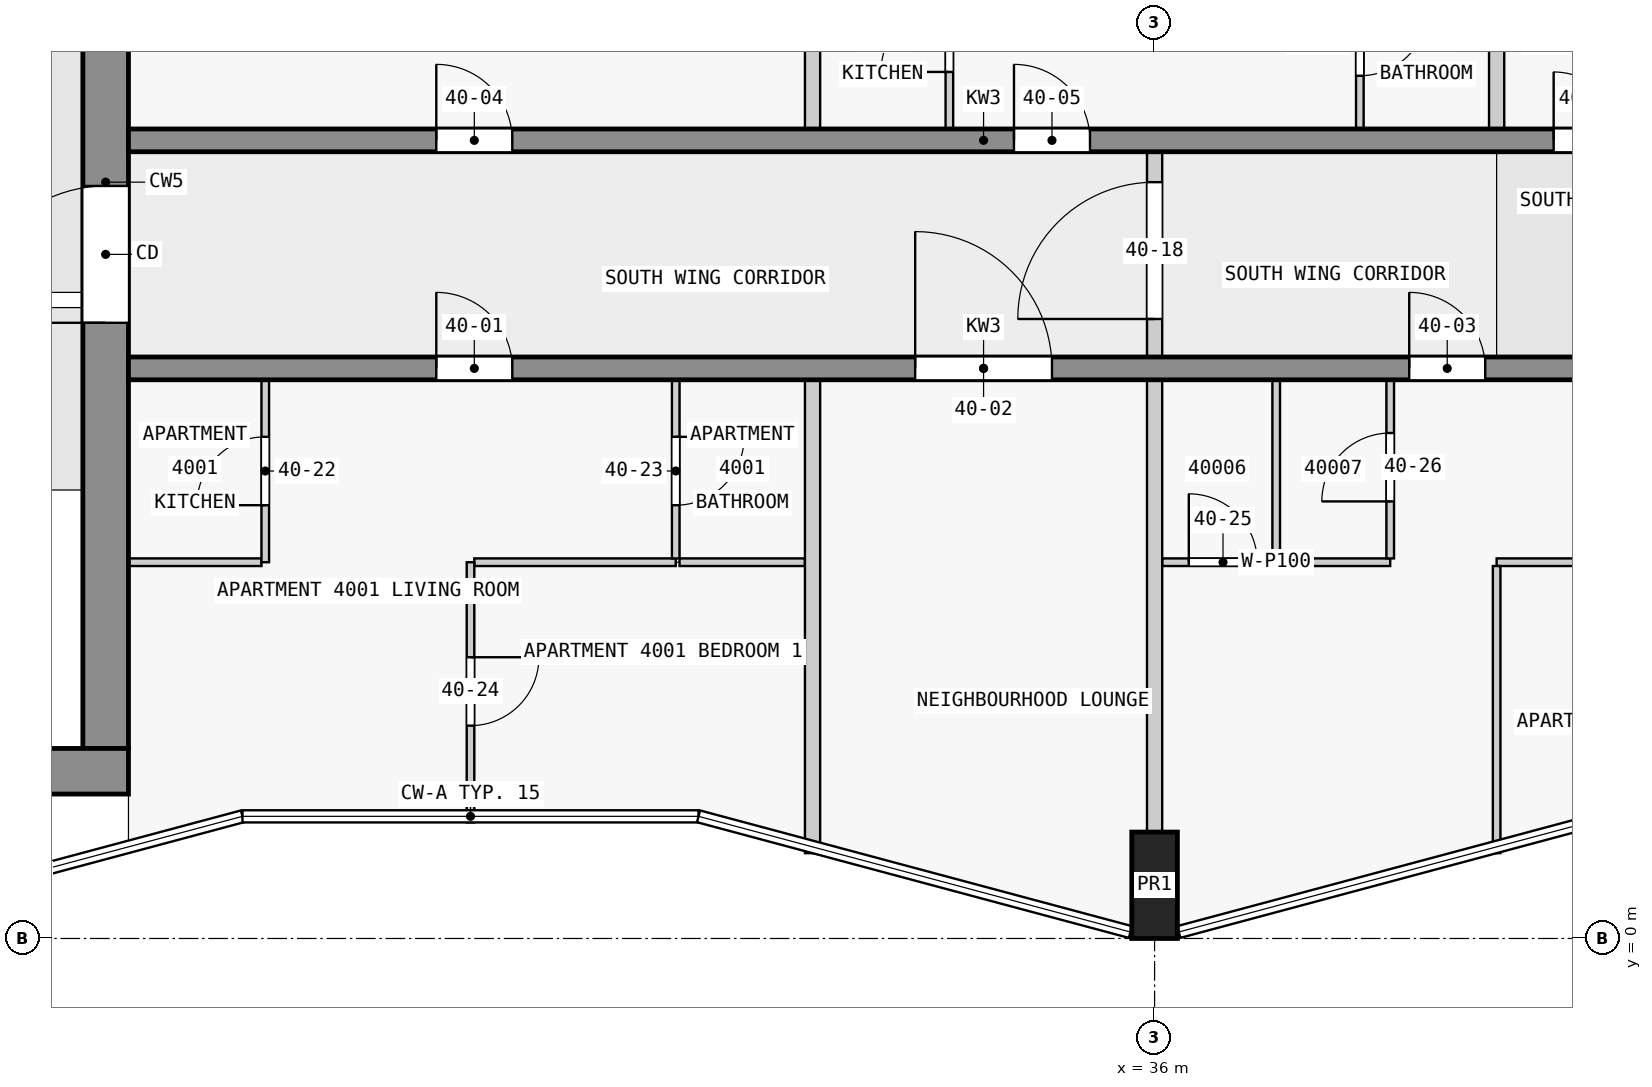
"""IFC4 building model, lengths in metres.
Left out: names, types, materials, properties, quantities, classifications, styles, units other than length and angle.
Written with IfcOpenShell. Run it as: python <this file> out.ifc"""

import sys

from ifc_helpers import new_model, si_unit, direction, frame, frame_2d, origin, origin_2d, place, context, subcontext, project, spatial, rectangle, extrude, element, fill, save


model = new_model("IFC4")
c1 = context("Model", 3, precision=1e-05, world=origin(), true_north=direction((0.0, 1.0)))
c2 = subcontext(c1, "Body", "Model", "MODEL_VIEW")
j1 = project(units=[si_unit("LENGTHUNIT", "METRE"), si_unit("PLANEANGLEUNIT", "RADIAN")], contexts=[c1])
p1 = place(None, origin())
s1 = spatial("IfcSite", under=j1, at=p1, CompositionType="ELEMENT")
p2 = place(p1, origin())
s2 = spatial("IfcBuilding", under=s1, at=p2, CompositionType="ELEMENT")
p3 = place(p2, frame((0.0, 0.0, 156.9)))
s3 = spatial("IfcBuildingStorey", under=s2, at=p3, CompositionType="ELEMENT", Elevation=156.9)
p4 = place(p3, frame((36.0, 0.7, 0.0), z_axis=(0.0, 0.0, 1.0), x_axis=(1.0, 0.0, 0.0)))
e1 = element("IfcColumn", 1, at=p4, inside=s3, PredefinedType="COLUMN", context=c2, shape_type="SweptSolid", body=[
    extrude(rectangle(XDim=0.6, YDim=1.4, at=origin_2d()), origin(), (0.0, 0.0, 1.0), 3.5),
])
p5 = place(p3, frame((1.7, 2.2, 0.0), z_axis=(0.0, 0.0, 1.0), x_axis=(1.0, 0.0, 0.0)))
e2 = element("IfcWall", 2, at=p5, inside=s3, PredefinedType="SHEAR", context=c2, shape_type="SweptSolid", body=[
    extrude(rectangle(XDim=20.8, YDim=0.6, at=frame_2d((10.4, 0.0))), origin(), (0.0, 0.0, 1.0), 3.25),
])
p6 = place(p3, frame((22.2, 2.5, 0.0), z_axis=(0.0, 0.0, 1.0), x_axis=(0.0, 1.0, 0.0)))
e3 = element("IfcWall", 3, at=p6, inside=s3, PredefinedType="SHEAR", context=c2, shape_type="SweptSolid", body=[
    extrude(rectangle(XDim=14.9, YDim=0.6, at=frame_2d((7.45, 0.0))), origin(), (0.0, 0.0, 1.0), 3.25),
])
p7 = place(p6, frame((5.6, 0.0, 0.0)))
e4 = element("IfcOpeningElement", 4, at=p7, cuts=e3, PredefinedType="OPENING", context=c2, shape_type="SweptSolid", body=[
    extrude(rectangle(XDim=1.8, YDim=2.1, at=frame_2d((0.9, 1.05))), frame((0.0, 0.31, 0.0), z_axis=(0.0, -1.0, 0.0), x_axis=(1.0, 0.0, 0.0)), (0.0, 0.0, 1.0), 0.62),
])
p8 = place(p3, frame((22.5, 7.5, 0.0), z_axis=(0.0, 0.0, 1.0), x_axis=(1.0, 0.0, 0.0)))
e5 = element("IfcWall", 5, at=p8, inside=s3, PredefinedType="SHEAR", context=c2, shape_type="SweptSolid", body=[
    extrude(rectangle(XDim=22.5, YDim=0.3, at=frame_2d((11.25, 0.0))), origin(), (0.0, 0.0, 1.0), 3.25),
])
p9 = place(p8, frame((4.05, 0.0, 0.0)))
e6 = element("IfcOpeningElement", 6, at=p9, cuts=e5, PredefinedType="OPENING", context=c2, shape_type="SweptSolid", body=[
    extrude(rectangle(XDim=1.0, YDim=2.1, at=frame_2d((0.5, 1.05))), frame((0.0, 0.16, 0.0), z_axis=(0.0, -1.0, 0.0), x_axis=(1.0, 0.0, 0.0)), (0.0, 0.0, 1.0), 0.32),
])
p10 = place(p8, frame((10.35, 0.0, 0.0)))
e7 = element("IfcOpeningElement", 7, at=p10, cuts=e5, PredefinedType="OPENING", context=c2, shape_type="SweptSolid", body=[
    extrude(rectangle(XDim=1.8, YDim=2.1, at=frame_2d((0.9, 1.05))), frame((0.0, 0.16, 0.0), z_axis=(0.0, -1.0, 0.0), x_axis=(1.0, 0.0, 0.0)), (0.0, 0.0, 1.0), 0.32),
])
p11 = place(p8, frame((16.85, 0.0, 0.0)))
e8 = element("IfcOpeningElement", 8, at=p11, cuts=e5, PredefinedType="OPENING", context=c2, shape_type="SweptSolid", body=[
    extrude(rectangle(XDim=1.0, YDim=2.1, at=frame_2d((0.5, 1.05))), frame((0.0, 0.16, 0.0), z_axis=(0.0, -1.0, 0.0), x_axis=(1.0, 0.0, 0.0)), (0.0, 0.0, 1.0), 0.32),
])
p12 = place(p3, frame((22.5, 10.5, 0.0), z_axis=(0.0, 0.0, 1.0), x_axis=(1.0, 0.0, 0.0)))
e9 = element("IfcWall", 9, at=p12, inside=s3, PredefinedType="SHEAR", context=c2, shape_type="SweptSolid", body=[
    extrude(rectangle(XDim=22.5, YDim=0.3, at=frame_2d((11.25, 0.0))), origin(), (0.0, 0.0, 1.0), 3.25),
])
p13 = place(p12, frame((4.05, 0.0, 0.0)))
e10 = element("IfcOpeningElement", 10, at=p13, cuts=e9, PredefinedType="OPENING", context=c2, shape_type="SweptSolid", body=[
    extrude(rectangle(XDim=1.0, YDim=2.1, at=frame_2d((0.5, 1.05))), frame((0.0, 0.16, 0.0), z_axis=(0.0, -1.0, 0.0), x_axis=(1.0, 0.0, 0.0)), (0.0, 0.0, 1.0), 0.32),
])
p14 = place(p12, frame((11.65, 0.0, 0.0)))
e11 = element("IfcOpeningElement", 11, at=p14, cuts=e9, PredefinedType="OPENING", context=c2, shape_type="SweptSolid", body=[
    extrude(rectangle(XDim=1.0, YDim=2.1, at=frame_2d((0.5, 1.05))), frame((0.0, 0.16, 0.0), z_axis=(0.0, -1.0, 0.0), x_axis=(1.0, 0.0, 0.0)), (0.0, 0.0, 1.0), 0.32),
])
p15 = place(p12, frame((18.75, 0.0, 0.0)))
e12 = element("IfcOpeningElement", 12, at=p15, cuts=e9, PredefinedType="OPENING", context=c2, shape_type="SweptSolid", body=[
    extrude(rectangle(XDim=0.9, YDim=2.1, at=frame_2d((0.45, 1.05))), frame((0.0, 0.16, 0.0), z_axis=(0.0, -1.0, 0.0), x_axis=(1.0, 0.0, 0.0)), (0.0, 0.0, 1.0), 0.32),
])
p16 = place(p12, frame((20.95, 0.0, 0.0)))
e13 = element("IfcOpeningElement", 13, at=p16, cuts=e9, PredefinedType="OPENING", context=c2, shape_type="SweptSolid", body=[
    extrude(rectangle(XDim=1.0, YDim=2.1, at=frame_2d((0.5, 1.05))), frame((0.0, 0.16, 0.0), z_axis=(0.0, -1.0, 0.0), x_axis=(1.0, 0.0, 0.0)), (0.0, 0.0, 1.0), 0.32),
])
p17 = place(p3, frame((29.7, 4.95, 0.0), z_axis=(0.0, 0.0, 1.0), x_axis=(-1.0, 0.0, 0.0)))
e14 = element("IfcWall", 14, at=p17, inside=s3, PredefinedType="PARTITIONING", context=c2, shape_type="SweptSolid", body=[
    extrude(rectangle(XDim=2.65, YDim=0.1, at=frame_2d((1.325, 0.0))), origin(), (0.0, 0.0, 1.0), 3.25),
])
p18 = place(p3, frame((54.08, 4.95, 0.0), z_axis=(0.0, 0.0, 1.0), x_axis=(-1.0, 0.0, 0.0)))
e15 = element("IfcWall", 15, at=p18, inside=s3, PredefinedType="PARTITIONING", context=c2, shape_type="SweptSolid", body=[
    extrude(rectangle(XDim=13.58, YDim=0.1, at=frame_2d((6.79, 0.0))), origin(), (0.0, 0.0, 1.0), 3.25),
])
p19 = place(p18, frame((10.85, 0.0, 0.0)))
e16 = element("IfcOpeningElement", 16, at=p19, cuts=e15, PredefinedType="OPENING", context=c2, shape_type="SweptSolid", body=[
    extrude(rectangle(XDim=0.9, YDim=2.1, at=frame_2d((0.45, 1.05))), frame((0.0, 0.06, 0.0), z_axis=(0.0, -1.0, 0.0), x_axis=(1.0, 0.0, 0.0)), (0.0, 0.0, 1.0), 0.12),
])
p20 = place(p18, frame((6.45, 0.0, 0.0)))
e17 = element("IfcOpeningElement", 17, at=p20, cuts=e15, PredefinedType="OPENING", context=c2, shape_type="SweptSolid", body=[
    extrude(rectangle(XDim=0.9, YDim=2.1, at=frame_2d((0.45, 1.05))), frame((0.0, 0.06, 0.0), z_axis=(0.0, -1.0, 0.0), x_axis=(1.0, 0.0, 0.0)), (0.0, 0.0, 1.0), 0.12),
])
p21 = place(p18, frame((1.95, 0.0, 0.0)))
e18 = element("IfcOpeningElement", 18, at=p21, cuts=e15, PredefinedType="OPENING", context=c2, shape_type="SweptSolid", body=[
    extrude(rectangle(XDim=0.9, YDim=2.1, at=frame_2d((0.45, 1.05))), frame((0.0, 0.06, 0.0), z_axis=(0.0, -1.0, 0.0), x_axis=(1.0, 0.0, 0.0)), (0.0, 0.0, 1.0), 0.12),
])
p22 = place(p3, frame((22.5, 4.95, 0.0), z_axis=(0.0, 0.0, 1.0), x_axis=(1.0, 0.0, 0.0)))
e19 = element("IfcWall", 19, at=p22, inside=s3, PredefinedType="PARTITIONING", context=c2, shape_type="SweptSolid", body=[
    extrude(rectangle(XDim=1.75, YDim=0.1, at=frame_2d((0.875, 0.0))), origin(), (0.0, 0.0, 1.0), 3.25),
])
p23 = place(p3, frame((29.75, 4.95, 0.0), z_axis=(0.0, 0.0, 1.0), x_axis=(1.0, 0.0, 0.0)))
e20 = element("IfcWall", 20, at=p23, inside=s3, PredefinedType="PARTITIONING", context=c2, shape_type="SweptSolid", body=[
    extrude(rectangle(XDim=1.65, YDim=0.1, at=frame_2d((0.825, 0.0))), origin(), (0.0, 0.0, 1.0), 3.25),
])
p24 = place(p3, frame((36.1, 4.95, 0.0), z_axis=(0.0, 0.0, 1.0), x_axis=(1.0, 0.0, 0.0)))
e21 = element("IfcWall", 21, at=p24, inside=s3, PredefinedType="PARTITIONING", context=c2, shape_type="SweptSolid", body=[
    extrude(rectangle(XDim=3.0, YDim=0.1, at=frame_2d((1.5, 0.0))), origin(), (0.0, 0.0, 1.0), 3.25),
])
p25 = place(p24, frame((0.35, 0.0, 0.0)))
e22 = element("IfcOpeningElement", 22, at=p25, cuts=e21, PredefinedType="OPENING", context=c2, shape_type="SweptSolid", body=[
    extrude(rectangle(XDim=0.9, YDim=2.1, at=frame_2d((0.45, 1.05))), frame((0.0, 0.06, 0.0), z_axis=(0.0, -1.0, 0.0), x_axis=(1.0, 0.0, 0.0)), (0.0, 0.0, 1.0), 0.12),
])
p26 = place(p3, frame((24.3, 4.95, 0.0), z_axis=(0.0, 0.0, 1.0), x_axis=(0.0, 1.0, 0.0)))
e23 = element("IfcWall", 23, at=p26, inside=s3, PredefinedType="PARTITIONING", context=c2, shape_type="SweptSolid", body=[
    extrude(rectangle(XDim=2.4, YDim=0.1, at=frame_2d((1.2, 0.0))), origin(), (0.0, 0.0, 1.0), 3.25),
])
p27 = place(p26, frame((0.75, 0.0, 0.0)))
e24 = element("IfcOpeningElement", 24, at=p27, cuts=e23, PredefinedType="OPENING", context=c2, shape_type="SweptSolid", body=[
    extrude(rectangle(XDim=0.9, YDim=2.1, at=frame_2d((0.45, 1.05))), frame((0.0, 0.06, 0.0), z_axis=(0.0, -1.0, 0.0), x_axis=(1.0, 0.0, 0.0)), (0.0, 0.0, 1.0), 0.12),
])
p28 = place(p3, frame((27.0, 4.95, 0.0), z_axis=(0.0, 0.0, 1.0), x_axis=(0.0, -1.0, 0.0)))
e25 = element("IfcWall", 25, at=p28, inside=s3, PredefinedType="PARTITIONING", context=c2, shape_type="SweptSolid", body=[
    extrude(rectangle(XDim=3.423, YDim=0.1, at=frame_2d((1.711, 0.0))), origin(), (0.0, 0.0, 1.0), 3.25),
])
p29 = place(p28, frame((1.25, 0.0, 0.0)))
e26 = element("IfcOpeningElement", 26, at=p29, cuts=e25, PredefinedType="OPENING", context=c2, shape_type="SweptSolid", body=[
    extrude(rectangle(XDim=0.9, YDim=2.1, at=frame_2d((0.45, 1.05))), frame((0.0, 0.06, 0.0), z_axis=(0.0, -1.0, 0.0), x_axis=(1.0, 0.0, 0.0)), (0.0, 0.0, 1.0), 0.12),
])
p30 = place(p3, frame((29.7, 7.35, 0.0), z_axis=(0.0, 0.0, 1.0), x_axis=(0.0, -1.0, 0.0)))
e27 = element("IfcWall", 27, at=p30, inside=s3, PredefinedType="PARTITIONING", context=c2, shape_type="SweptSolid", body=[
    extrude(rectangle(XDim=2.35, YDim=0.1, at=frame_2d((1.175, 0.0))), origin(), (0.0, 0.0, 1.0), 3.25),
])
p31 = place(p30, frame((0.75, 0.0, 0.0)))
e28 = element("IfcOpeningElement", 28, at=p31, cuts=e27, PredefinedType="OPENING", context=c2, shape_type="SweptSolid", body=[
    extrude(rectangle(XDim=0.9, YDim=2.1, at=frame_2d((0.45, 1.05))), frame((0.0, 0.06, 0.0), z_axis=(0.0, -1.0, 0.0), x_axis=(1.0, 0.0, 0.0)), (0.0, 0.0, 1.0), 0.12),
])
for number, where, z_axis, x_axis in (
    (29, (31.5, 1.122, 0.0), (0.0, 0.0, 1.0), (0.0, 1.0, 0.0)),
    (30, (31.5, 10.65, 0.0), (0.0, 0.0, 1.0), (0.0, 1.0, 0.0)),
):
    element("IfcWall", number, at=place(p3, frame(where, z_axis=z_axis, x_axis=x_axis)), inside=s3, PredefinedType="PARTITIONING", context=c2, shape_type="SweptSolid", body=[
        extrude(rectangle(XDim=6.228, YDim=0.2, at=frame_2d((3.114, 0.0))), origin(), (0.0, 0.0, 1.0), 3.25),
    ])
p32 = place(p3, frame((33.3, 10.65, 0.0), z_axis=(0.0, 0.0, 1.0), x_axis=(0.0, 1.0, 0.0)))
e31 = element("IfcWall", 31, at=p32, inside=s3, PredefinedType="PARTITIONING", context=c2, shape_type="SweptSolid", body=[
    extrude(rectangle(XDim=2.4, YDim=0.1, at=frame_2d((1.2, 0.0))), origin(), (0.0, 0.0, 1.0), 3.25),
])
p33 = place(p32, frame((0.75, 0.0, 0.0)))
e32 = element("IfcOpeningElement", 32, at=p33, cuts=e31, PredefinedType="OPENING", context=c2, shape_type="SweptSolid", body=[
    extrude(rectangle(XDim=0.9, YDim=2.1, at=frame_2d((0.45, 1.05))), frame((0.0, 0.06, 0.0), z_axis=(0.0, -1.0, 0.0), x_axis=(1.0, 0.0, 0.0)), (0.0, 0.0, 1.0), 0.12),
])
p34 = place(p3, frame((36.0, 1.4, 0.0), z_axis=(0.0, 0.0, 1.0), x_axis=(0.0, 1.0, 0.0)))
e33 = element("IfcWall", 33, at=p34, inside=s3, PredefinedType="PARTITIONING", context=c2, shape_type="SweptSolid", body=[
    extrude(rectangle(XDim=5.95, YDim=0.2, at=frame_2d((2.975, 0.0))), origin(), (0.0, 0.0, 1.0), 3.25),
])
p35 = place(p3, frame((37.6, 5.0, 0.0), z_axis=(0.0, 0.0, 1.0), x_axis=(0.0, 1.0, 0.0)))
e34 = element("IfcWall", 34, at=p35, inside=s3, PredefinedType="PARTITIONING", context=c2, shape_type="SweptSolid", body=[
    extrude(rectangle(XDim=2.35, YDim=0.1, at=frame_2d((1.175, 0.0))), origin(), (0.0, 0.0, 1.0), 3.25),
])
p36 = place(p3, frame((38.7, 13.0, 0.0), z_axis=(0.0, 0.0, 1.0), x_axis=(0.0, -1.0, 0.0)))
e35 = element("IfcWall", 35, at=p36, inside=s3, PredefinedType="PARTITIONING", context=c2, shape_type="SweptSolid", body=[
    extrude(rectangle(XDim=2.35, YDim=0.1, at=frame_2d((1.175, 0.0))), origin(), (0.0, 0.0, 1.0), 3.25),
])
p37 = place(p36, frame((0.75, 0.0, 0.0)))
e36 = element("IfcOpeningElement", 36, at=p37, cuts=e35, PredefinedType="OPENING", context=c2, shape_type="SweptSolid", body=[
    extrude(rectangle(XDim=0.9, YDim=2.1, at=frame_2d((0.45, 1.05))), frame((0.0, 0.06, 0.0), z_axis=(0.0, -1.0, 0.0), x_axis=(1.0, 0.0, 0.0)), (0.0, 0.0, 1.0), 0.12),
])
p38 = place(p3, frame((39.1, 5.0, 0.0), z_axis=(0.0, 0.0, 1.0), x_axis=(0.0, 1.0, 0.0)))
e37 = element("IfcWall", 37, at=p38, inside=s3, PredefinedType="PARTITIONING", context=c2, shape_type="SweptSolid", body=[
    extrude(rectangle(XDim=2.35, YDim=0.1, at=frame_2d((1.175, 0.0))), origin(), (0.0, 0.0, 1.0), 3.25),
])
p39 = place(p38, frame((0.75, 0.0, 0.0)))
e38 = element("IfcOpeningElement", 38, at=p39, cuts=e37, PredefinedType="OPENING", context=c2, shape_type="SweptSolid", body=[
    extrude(rectangle(XDim=0.9, YDim=2.1, at=frame_2d((0.45, 1.05))), frame((0.0, 0.06, 0.0), z_axis=(0.0, -1.0, 0.0), x_axis=(1.0, 0.0, 0.0)), (0.0, 0.0, 1.0), 0.12),
])
p40 = place(p3, frame((40.5, 4.9, 0.0), z_axis=(0.0, 0.0, 1.0), x_axis=(0.0, -1.0, 0.0)))
e39 = element("IfcWall", 39, at=p40, inside=s3, PredefinedType="PARTITIONING", context=c2, shape_type="SweptSolid", body=[
    extrude(rectangle(XDim=3.778, YDim=0.1, at=frame_2d((1.889, 0.0))), origin(), (0.0, 0.0, 1.0), 3.25),
])
p41 = place(p3, frame((40.5, 10.65, 0.0), z_axis=(0.0, 0.0, 1.0), x_axis=(0.0, 1.0, 0.0)))
e40 = element("IfcWall", 40, at=p41, inside=s3, PredefinedType="PARTITIONING", context=c2, shape_type="SweptSolid", body=[
    extrude(rectangle(XDim=6.228, YDim=0.2, at=frame_2d((3.114, 0.0))), origin(), (0.0, 0.0, 1.0), 3.25),
])
p42 = place(p3, frame((36.0, 7.45, 0.0), z_axis=(0.0, 0.0, 1.0), x_axis=(0.0, 1.0, 0.0)))
e41 = element("IfcWall", 41, at=p42, inside=s3, PredefinedType="PARTITIONING", context=c2, shape_type="SweptSolid", body=[
    extrude(rectangle(XDim=3.2, YDim=0.2, at=frame_2d((1.6, 0.0))), origin(), (0.0, 0.0, 1.0), 3.25),
])
p43 = place(p42, frame((0.7, 0.0, 0.0)))
e42 = element("IfcOpeningElement", 42, at=p43, cuts=e41, PredefinedType="OPENING", context=c2, shape_type="SweptSolid", body=[
    extrude(rectangle(XDim=1.8, YDim=2.1, at=frame_2d((0.9, 1.05))), frame((0.0, 0.11, 0.0), z_axis=(0.0, -1.0, 0.0), x_axis=(1.0, 0.0, 0.0)), (0.0, 0.0, 1.0), 0.22),
])
p44 = place(p7, origin())
e43 = element("IfcDoor", 43, at=p44, inside=s3, OperationType="DOUBLE_DOOR_SINGLE_SWING", PredefinedType="DOOR", context=c2, shape_type="SweptSolid", body=[
    extrude(rectangle(XDim=1.8, YDim=2.1, at=frame_2d((0.9, 1.05))), frame((0.0, 0.025, 0.0), z_axis=(0.0, -1.0, 0.0), x_axis=(1.0, 0.0, 0.0)), (0.0, 0.0, 1.0), 0.05),
])
fill(e4, e43)
p45 = place(p9, origin())
e44 = element("IfcDoor", 44, at=p45, inside=s3, OperationType="SINGLE_SWING_LEFT", PredefinedType="DOOR", context=c2, shape_type="SweptSolid", body=[
    extrude(rectangle(XDim=1.0, YDim=2.1, at=frame_2d((0.5, 1.05))), frame((0.0, 0.025, 0.0), z_axis=(0.0, -1.0, 0.0), x_axis=(1.0, 0.0, 0.0)), (0.0, 0.0, 1.0), 0.05),
])
fill(e6, e44)
p46 = place(p10, origin())
e45 = element("IfcDoor", 45, at=p46, inside=s3, OperationType="SINGLE_SWING_LEFT", PredefinedType="DOOR", context=c2, shape_type="SweptSolid", body=[
    extrude(rectangle(XDim=1.8, YDim=2.1, at=frame_2d((0.9, 1.05))), frame((0.0, 0.025, 0.0), z_axis=(0.0, -1.0, 0.0), x_axis=(1.0, 0.0, 0.0)), (0.0, 0.0, 1.0), 0.05),
])
fill(e7, e45)
p47 = place(p11, origin())
e46 = element("IfcDoor", 46, at=p47, inside=s3, OperationType="SINGLE_SWING_RIGHT", PredefinedType="DOOR", context=c2, shape_type="SweptSolid", body=[
    extrude(rectangle(XDim=1.0, YDim=2.1, at=frame_2d((0.5, 1.05))), frame((0.0, 0.025, 0.0), z_axis=(0.0, -1.0, 0.0), x_axis=(1.0, 0.0, 0.0)), (0.0, 0.0, 1.0), 0.05),
])
fill(e8, e46)
p48 = place(p13, origin())
e47 = element("IfcDoor", 47, at=p48, inside=s3, OperationType="SINGLE_SWING_LEFT", PredefinedType="DOOR", context=c2, shape_type="SweptSolid", body=[
    extrude(rectangle(XDim=1.0, YDim=2.1, at=frame_2d((0.5, 1.05))), frame((0.0, 0.025, 0.0), z_axis=(0.0, -1.0, 0.0), x_axis=(1.0, 0.0, 0.0)), (0.0, 0.0, 1.0), 0.05),
])
fill(e10, e47)
p49 = place(p14, origin())
e48 = element("IfcDoor", 48, at=p49, inside=s3, OperationType="SINGLE_SWING_RIGHT", PredefinedType="DOOR", context=c2, shape_type="SweptSolid", body=[
    extrude(rectangle(XDim=1.0, YDim=2.1, at=frame_2d((0.5, 1.05))), frame((0.0, 0.025, 0.0), z_axis=(0.0, -1.0, 0.0), x_axis=(1.0, 0.0, 0.0)), (0.0, 0.0, 1.0), 0.05),
])
fill(e11, e48)
p50 = place(p15, origin())
e49 = element("IfcDoor", 49, at=p50, inside=s3, OperationType="SINGLE_SWING_RIGHT", PredefinedType="DOOR", context=c2, shape_type="SweptSolid", body=[
    extrude(rectangle(XDim=0.9, YDim=2.1, at=frame_2d((0.45, 1.05))), frame((0.0, 0.025, 0.0), z_axis=(0.0, -1.0, 0.0), x_axis=(1.0, 0.0, 0.0)), (0.0, 0.0, 1.0), 0.05),
])
fill(e12, e49)
p51 = place(p43, origin())
e50 = element("IfcDoor", 50, at=p51, inside=s3, OperationType="SINGLE_SWING_LEFT", PredefinedType="DOOR", context=c2, shape_type="SweptSolid", body=[
    extrude(rectangle(XDim=1.8, YDim=2.1, at=frame_2d((0.9, 1.05))), frame((0.0, 0.025, 0.0), z_axis=(0.0, -1.0, 0.0), x_axis=(1.0, 0.0, 0.0)), (0.0, 0.0, 1.0), 0.05),
])
fill(e42, e50)
p52 = place(p27, origin())
e51 = element("IfcDoor", 51, at=p52, inside=s3, OperationType="SINGLE_SWING_RIGHT", PredefinedType="DOOR", context=c2, shape_type="SweptSolid", body=[
    extrude(rectangle(XDim=0.9, YDim=2.1, at=frame_2d((0.45, 1.05))), frame((0.0, 0.025, 0.0), z_axis=(0.0, -1.0, 0.0), x_axis=(1.0, 0.0, 0.0)), (0.0, 0.0, 1.0), 0.05),
])
fill(e24, e51)
p53 = place(p31, origin())
e52 = element("IfcDoor", 52, at=p53, inside=s3, OperationType="SINGLE_SWING_RIGHT", PredefinedType="DOOR", context=c2, shape_type="SweptSolid", body=[
    extrude(rectangle(XDim=0.9, YDim=2.1, at=frame_2d((0.45, 1.05))), frame((0.0, 0.025, 0.0), z_axis=(0.0, -1.0, 0.0), x_axis=(1.0, 0.0, 0.0)), (0.0, 0.0, 1.0), 0.05),
])
fill(e28, e52)
p54 = place(p29, origin())
e53 = element("IfcDoor", 53, at=p54, inside=s3, OperationType="SINGLE_SWING_LEFT", PredefinedType="DOOR", context=c2, shape_type="SweptSolid", body=[
    extrude(rectangle(XDim=0.9, YDim=2.1, at=frame_2d((0.45, 1.05))), frame((0.0, 0.025, 0.0), z_axis=(0.0, -1.0, 0.0), x_axis=(1.0, 0.0, 0.0)), (0.0, 0.0, 1.0), 0.05),
])
fill(e26, e53)
p55 = place(p25, origin())
e54 = element("IfcDoor", 54, at=p55, inside=s3, OperationType="SINGLE_SWING_LEFT", PredefinedType="DOOR", context=c2, shape_type="SweptSolid", body=[
    extrude(rectangle(XDim=0.9, YDim=2.1, at=frame_2d((0.45, 1.05))), frame((0.0, 0.025, 0.0), z_axis=(0.0, -1.0, 0.0), x_axis=(1.0, 0.0, 0.0)), (0.0, 0.0, 1.0), 0.05),
])
fill(e22, e54)
p56 = place(p39, origin())
e55 = element("IfcDoor", 55, at=p56, inside=s3, OperationType="SINGLE_SWING_RIGHT", PredefinedType="DOOR", context=c2, shape_type="SweptSolid", body=[
    extrude(rectangle(XDim=0.9, YDim=2.1, at=frame_2d((0.45, 1.05))), frame((0.0, 0.025, 0.0), z_axis=(0.0, -1.0, 0.0), x_axis=(1.0, 0.0, 0.0)), (0.0, 0.0, 1.0), 0.05),
])
fill(e38, e55)
p57 = place(p33, origin())
e56 = element("IfcDoor", 56, at=p57, inside=s3, OperationType="SINGLE_SWING_LEFT", PredefinedType="DOOR", context=c2, shape_type="SweptSolid", body=[
    extrude(rectangle(XDim=0.9, YDim=2.1, at=frame_2d((0.45, 1.05))), frame((0.0, 0.025, 0.0), z_axis=(0.0, -1.0, 0.0), x_axis=(1.0, 0.0, 0.0)), (0.0, 0.0, 1.0), 0.05),
])
fill(e32, e56)
p58 = place(p37, origin())
e57 = element("IfcDoor", 57, at=p58, inside=s3, OperationType="SINGLE_SWING_RIGHT", PredefinedType="DOOR", context=c2, shape_type="SweptSolid", body=[
    extrude(rectangle(XDim=0.9, YDim=2.1, at=frame_2d((0.45, 1.05))), frame((0.0, 0.025, 0.0), z_axis=(0.0, -1.0, 0.0), x_axis=(1.0, 0.0, 0.0)), (0.0, 0.0, 1.0), 0.05),
])
fill(e36, e57)
save(model, sys.argv[1])
